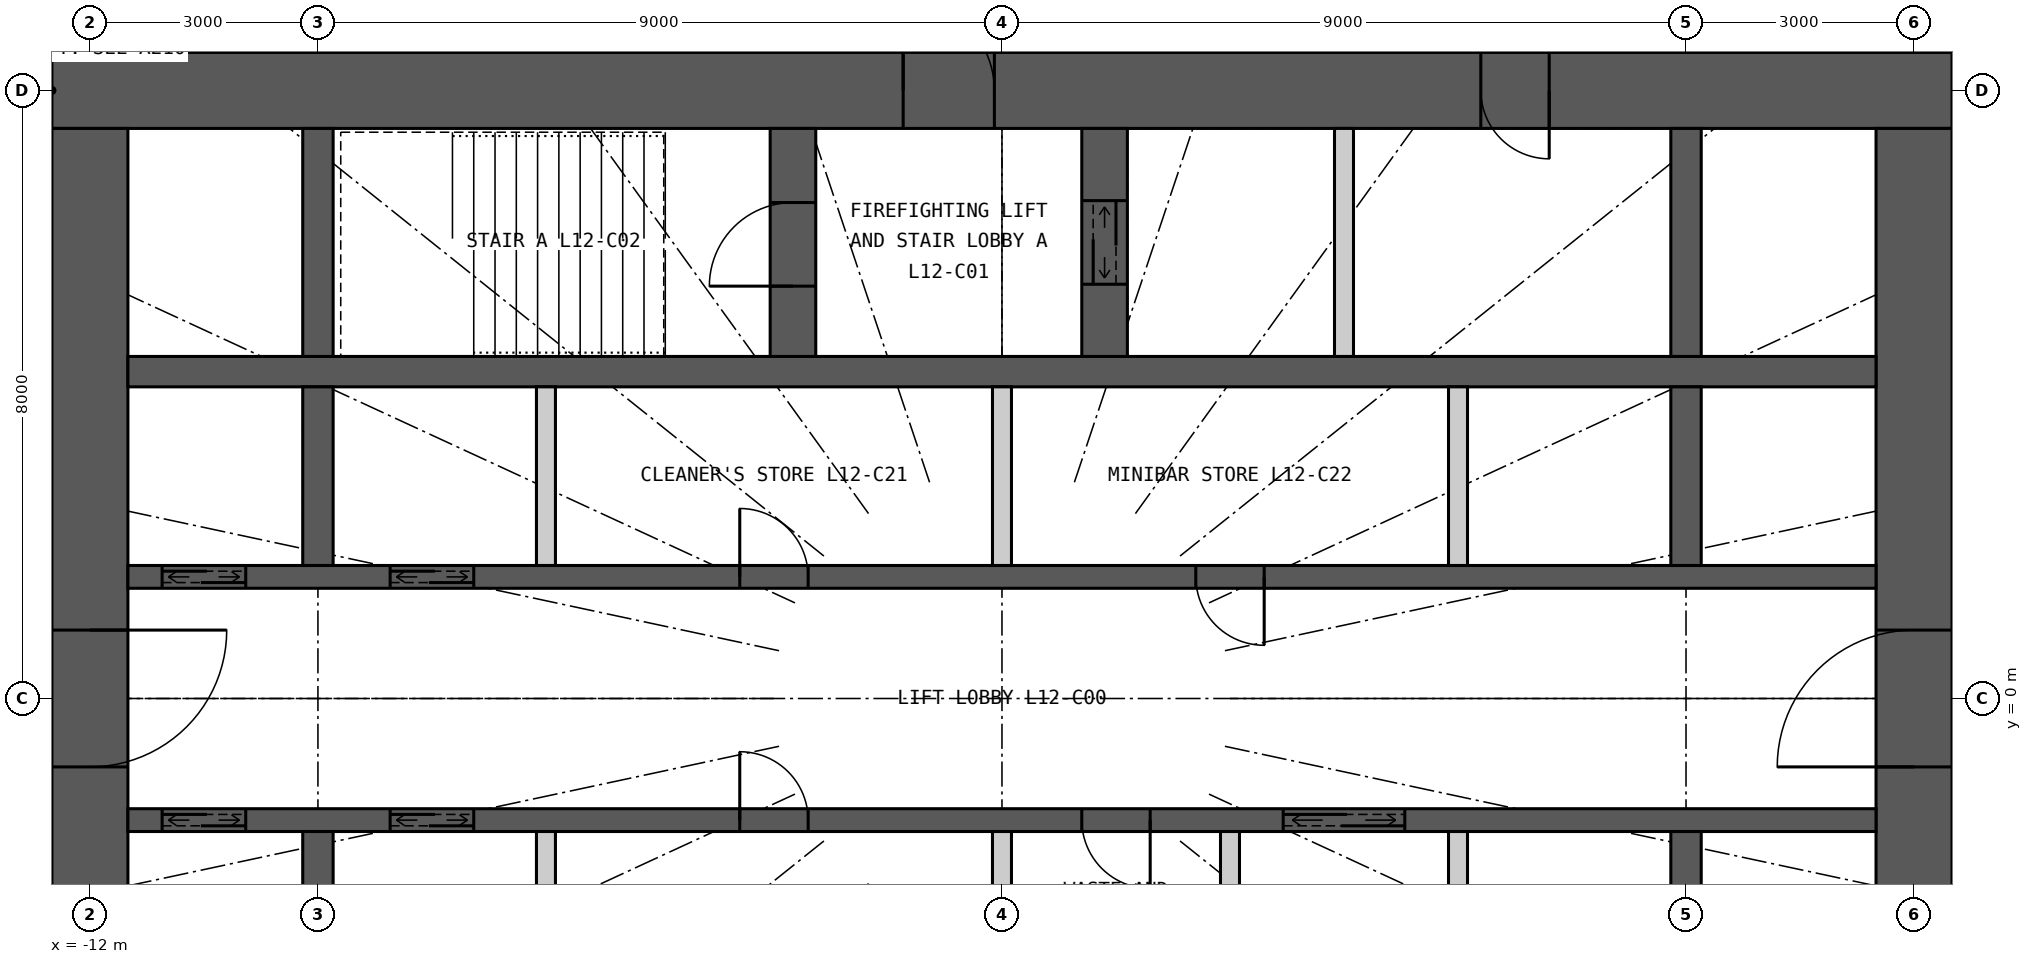
"""IFC4 building model, lengths in metres.
Left out: names, types, materials, properties, quantities, classifications, styles, units other than length and angle.
Written with IfcOpenShell. Run it as: python <this file> out.ifc"""

import sys

from ifc_helpers import new_model, si_unit, direction, frame, frame_2d, origin, place, context, subcontext, project, spatial, rectangle, extrude, element, fill, save


model = new_model("IFC4")
c1 = context("Model", 3, precision=1e-05, world=origin(), true_north=direction((0.0, 1.0)))
c2 = subcontext(c1, "Body", "Model", "MODEL_VIEW")
j1 = project(units=[si_unit("LENGTHUNIT", "METRE"), si_unit("PLANEANGLEUNIT", "RADIAN")], contexts=[c1])
p1 = place(None, origin())
s1 = spatial("IfcSite", under=j1, at=p1, CompositionType="ELEMENT")
p2 = place(p1, origin())
s2 = spatial("IfcBuilding", under=s1, at=p2, CompositionType="ELEMENT")
p3 = place(p2, frame((0.0, 0.0, 54.0)))
s3 = spatial("IfcBuildingStorey", under=s2, at=p3, CompositionType="ELEMENT", Elevation=54.0)
p4 = place(p3, frame((-12.5, 8.0, 0.0), z_axis=(0.0, 0.0, 1.0), x_axis=(1.0, 0.0, 0.0)))
e1 = element("IfcWall", 1, at=p4, inside=s3, PredefinedType="SHEAR", context=c2, shape_type="SweptSolid", body=[
    extrude(rectangle(XDim=25.0, YDim=1.0, at=frame_2d((12.5, 0.0))), origin(), (0.0, 0.0, 1.0), 3.3),
])
p5 = place(p4, frame((11.2, 0.0, 0.0)))
e2 = element("IfcOpeningElement", 2, at=p5, cuts=e1, PredefinedType="OPENING", context=c2, shape_type="SweptSolid", body=[
    extrude(rectangle(XDim=1.2, YDim=2.2, at=frame_2d((0.6, 1.1))), frame((0.0, 0.51, 0.0), z_axis=(0.0, -1.0, 0.0), x_axis=(1.0, 0.0, 0.0)), (0.0, 0.0, 1.0), 1.02),
])
p6 = place(p4, frame((18.8, 0.0, 0.0)))
e3 = element("IfcOpeningElement", 3, at=p6, cuts=e1, PredefinedType="OPENING", context=c2, shape_type="SweptSolid", body=[
    extrude(rectangle(XDim=0.9, YDim=2.2, at=frame_2d((0.45, 1.1))), frame((0.0, 0.51, 0.0), z_axis=(0.0, -1.0, 0.0), x_axis=(1.0, 0.0, 0.0)), (0.0, 0.0, 1.0), 1.02),
])
p7 = place(p3, frame((12.0, -7.5, 0.0), z_axis=(0.0, 0.0, 1.0), x_axis=(0.0, 1.0, 0.0)))
e4 = element("IfcWall", 4, at=p7, inside=s3, PredefinedType="SHEAR", context=c2, shape_type="SweptSolid", body=[
    extrude(rectangle(XDim=15.0, YDim=1.0, at=frame_2d((7.5, 0.0))), origin(), (0.0, 0.0, 1.0), 3.3),
])
p8 = place(p7, frame((6.6, 0.0, 0.0)))
e5 = element("IfcOpeningElement", 5, at=p8, cuts=e4, PredefinedType="OPENING", context=c2, shape_type="SweptSolid", body=[
    extrude(rectangle(XDim=1.8, YDim=2.2, at=frame_2d((0.9, 1.1))), frame((0.0, 0.51, 0.0), z_axis=(0.0, -1.0, 0.0), x_axis=(1.0, 0.0, 0.0)), (0.0, 0.0, 1.0), 1.02),
])
p9 = place(p3, frame((-12.0, 7.5, 0.0), z_axis=(0.0, 0.0, 1.0), x_axis=(0.0, -1.0, 0.0)))
e6 = element("IfcWall", 6, at=p9, inside=s3, PredefinedType="SHEAR", context=c2, shape_type="SweptSolid", body=[
    extrude(rectangle(XDim=15.0, YDim=1.0, at=frame_2d((7.5, 0.0))), origin(), (0.0, 0.0, 1.0), 3.3),
])
p10 = place(p9, frame((6.6, 0.0, 0.0)))
e7 = element("IfcOpeningElement", 7, at=p10, cuts=e6, PredefinedType="OPENING", context=c2, shape_type="SweptSolid", body=[
    extrude(rectangle(XDim=1.8, YDim=2.2, at=frame_2d((0.9, 1.1))), frame((0.0, 0.51, 0.0), z_axis=(0.0, -1.0, 0.0), x_axis=(1.0, 0.0, 0.0)), (0.0, 0.0, 1.0), 1.02),
])
p11 = place(p3, frame((-11.5, 4.3, 0.0), z_axis=(0.0, 0.0, 1.0), x_axis=(1.0, 0.0, 0.0)))
e8 = element("IfcWall", 8, at=p11, inside=s3, PredefinedType="SHEAR", context=c2, shape_type="SweptSolid", body=[
    extrude(rectangle(XDim=23.0, YDim=0.4, at=frame_2d((11.5, 0.0))), origin(), (0.0, 0.0, 1.0), 3.3),
])
p12 = place(p3, frame((-11.5, 1.6, 0.0), z_axis=(0.0, 0.0, 1.0), x_axis=(1.0, 0.0, 0.0)))
e9 = element("IfcWall", 9, at=p12, inside=s3, PredefinedType="SHEAR", context=c2, shape_type="SweptSolid", body=[
    extrude(rectangle(XDim=23.0, YDim=0.3, at=frame_2d((11.5, 0.0))), origin(), (0.0, 0.0, 1.0), 3.3),
])
p13 = place(p12, frame((0.45, 0.0, 0.0)))
e10 = element("IfcOpeningElement", 10, at=p13, cuts=e9, PredefinedType="OPENING", context=c2, shape_type="SweptSolid", body=[
    extrude(rectangle(XDim=1.1, YDim=2.2, at=frame_2d((0.55, 1.1))), frame((0.0, 0.16, 0.0), z_axis=(0.0, -1.0, 0.0), x_axis=(1.0, 0.0, 0.0)), (0.0, 0.0, 1.0), 0.32),
])
p14 = place(p12, frame((3.45, 0.0, 0.0)))
e11 = element("IfcOpeningElement", 11, at=p14, cuts=e9, PredefinedType="OPENING", context=c2, shape_type="SweptSolid", body=[
    extrude(rectangle(XDim=1.1, YDim=2.2, at=frame_2d((0.55, 1.1))), frame((0.0, 0.16, 0.0), z_axis=(0.0, -1.0, 0.0), x_axis=(1.0, 0.0, 0.0)), (0.0, 0.0, 1.0), 0.32),
])
p15 = place(p12, frame((8.05, 0.0, 0.0)))
e12 = element("IfcOpeningElement", 12, at=p15, cuts=e9, PredefinedType="OPENING", context=c2, shape_type="SweptSolid", body=[
    extrude(rectangle(XDim=0.9, YDim=2.2, at=frame_2d((0.45, 1.1))), frame((0.0, 0.16, 0.0), z_axis=(0.0, -1.0, 0.0), x_axis=(1.0, 0.0, 0.0)), (0.0, 0.0, 1.0), 0.32),
])
p16 = place(p12, frame((14.05, 0.0, 0.0)))
e13 = element("IfcOpeningElement", 13, at=p16, cuts=e9, PredefinedType="OPENING", context=c2, shape_type="SweptSolid", body=[
    extrude(rectangle(XDim=0.9, YDim=2.2, at=frame_2d((0.45, 1.1))), frame((0.0, 0.16, 0.0), z_axis=(0.0, -1.0, 0.0), x_axis=(1.0, 0.0, 0.0)), (0.0, 0.0, 1.0), 0.32),
])
p17 = place(p3, frame((-11.5, -1.6, 0.0), z_axis=(0.0, 0.0, 1.0), x_axis=(1.0, 0.0, 0.0)))
e14 = element("IfcWall", 14, at=p17, inside=s3, PredefinedType="SHEAR", context=c2, shape_type="SweptSolid", body=[
    extrude(rectangle(XDim=23.0, YDim=0.3, at=frame_2d((11.5, 0.0))), origin(), (0.0, 0.0, 1.0), 3.3),
])
p18 = place(p17, frame((0.45, 0.0, 0.0)))
e15 = element("IfcOpeningElement", 15, at=p18, cuts=e14, PredefinedType="OPENING", context=c2, shape_type="SweptSolid", body=[
    extrude(rectangle(XDim=1.1, YDim=2.2, at=frame_2d((0.55, 1.1))), frame((0.0, 0.16, 0.0), z_axis=(0.0, -1.0, 0.0), x_axis=(1.0, 0.0, 0.0)), (0.0, 0.0, 1.0), 0.32),
])
p19 = place(p17, frame((3.45, 0.0, 0.0)))
e16 = element("IfcOpeningElement", 16, at=p19, cuts=e14, PredefinedType="OPENING", context=c2, shape_type="SweptSolid", body=[
    extrude(rectangle(XDim=1.1, YDim=2.2, at=frame_2d((0.55, 1.1))), frame((0.0, 0.16, 0.0), z_axis=(0.0, -1.0, 0.0), x_axis=(1.0, 0.0, 0.0)), (0.0, 0.0, 1.0), 0.32),
])
p20 = place(p17, frame((15.2, 0.0, 0.0)))
e17 = element("IfcOpeningElement", 17, at=p20, cuts=e14, PredefinedType="OPENING", context=c2, shape_type="SweptSolid", body=[
    extrude(rectangle(XDim=1.6, YDim=2.4, at=frame_2d((0.8, 1.2))), frame((0.0, 0.16, 0.0), z_axis=(0.0, -1.0, 0.0), x_axis=(1.0, 0.0, 0.0)), (0.0, 0.0, 1.0), 0.32),
])
p21 = place(p17, frame((8.05, 0.0, 0.0)))
e18 = element("IfcOpeningElement", 18, at=p21, cuts=e14, PredefinedType="OPENING", context=c2, shape_type="SweptSolid", body=[
    extrude(rectangle(XDim=0.9, YDim=2.2, at=frame_2d((0.45, 1.1))), frame((0.0, 0.16, 0.0), z_axis=(0.0, -1.0, 0.0), x_axis=(1.0, 0.0, 0.0)), (0.0, 0.0, 1.0), 0.32),
])
p22 = place(p17, frame((12.55, 0.0, 0.0)))
e19 = element("IfcOpeningElement", 19, at=p22, cuts=e14, PredefinedType="OPENING", context=c2, shape_type="SweptSolid", body=[
    extrude(rectangle(XDim=0.9, YDim=2.2, at=frame_2d((0.45, 1.1))), frame((0.0, 0.16, 0.0), z_axis=(0.0, -1.0, 0.0), x_axis=(1.0, 0.0, 0.0)), (0.0, 0.0, 1.0), 0.32),
])
p23 = place(p3, frame((-9.0, 4.5, 0.0), z_axis=(0.0, 0.0, 1.0), x_axis=(0.0, 1.0, 0.0)))
e20 = element("IfcWall", 20, at=p23, inside=s3, PredefinedType="SHEAR", context=c2, shape_type="SweptSolid", body=[
    extrude(rectangle(XDim=3.0, YDim=0.4, at=frame_2d((1.5, 0.0))), origin(), (0.0, 0.0, 1.0), 3.3),
])
for number, where, z_axis, x_axis in (
    (21, (-9.0, 1.75, 0.0), (0.0, 0.0, 1.0), (0.0, 1.0, 0.0)),
    (22, (-9.0, -4.1, 0.0), (0.0, 0.0, 1.0), (0.0, 1.0, 0.0)),
):
    element("IfcWall", number, at=place(p3, frame(where, z_axis=z_axis, x_axis=x_axis)), inside=s3, PredefinedType="SHEAR", context=c2, shape_type="SweptSolid", body=[
        extrude(rectangle(XDim=2.35, YDim=0.4, at=frame_2d((1.175, 0.0))), origin(), (0.0, 0.0, 1.0), 3.3),
    ])
p24 = place(p3, frame((9.0, 4.5, 0.0), z_axis=(0.0, 0.0, 1.0), x_axis=(0.0, 1.0, 0.0)))
e23 = element("IfcWall", 23, at=p24, inside=s3, PredefinedType="SHEAR", context=c2, shape_type="SweptSolid", body=[
    extrude(rectangle(XDim=3.0, YDim=0.4, at=frame_2d((1.5, 0.0))), origin(), (0.0, 0.0, 1.0), 3.3),
])
for number, where, z_axis, x_axis in (
    (24, (9.0, 1.75, 0.0), (0.0, 0.0, 1.0), (0.0, 1.0, 0.0)),
    (25, (9.0, -4.1, 0.0), (0.0, 0.0, 1.0), (0.0, 1.0, 0.0)),
):
    element("IfcWall", number, at=place(p3, frame(where, z_axis=z_axis, x_axis=x_axis)), inside=s3, PredefinedType="SHEAR", context=c2, shape_type="SweptSolid", body=[
        extrude(rectangle(XDim=2.35, YDim=0.4, at=frame_2d((1.175, 0.0))), origin(), (0.0, 0.0, 1.0), 3.3),
    ])
p25 = place(p3, frame((-2.75, 4.5, 0.0), z_axis=(0.0, 0.0, 1.0), x_axis=(0.0, 1.0, 0.0)))
e26 = element("IfcWall", 26, at=p25, inside=s3, PredefinedType="SHEAR", context=c2, shape_type="SweptSolid", body=[
    extrude(rectangle(XDim=3.0, YDim=0.6, at=frame_2d((1.5, 0.0))), origin(), (0.0, 0.0, 1.0), 3.3),
])
p26 = place(p25, frame((0.925, 0.0, 0.0)))
e27 = element("IfcOpeningElement", 27, at=p26, cuts=e26, PredefinedType="OPENING", context=c2, shape_type="SweptSolid", body=[
    extrude(rectangle(XDim=1.1, YDim=2.2, at=frame_2d((0.55, 1.1))), frame((0.0, 0.31, 0.0), z_axis=(0.0, -1.0, 0.0), x_axis=(1.0, 0.0, 0.0)), (0.0, 0.0, 1.0), 0.62),
])
p27 = place(p3, frame((1.35, 4.5, 0.0), z_axis=(0.0, 0.0, 1.0), x_axis=(0.0, 1.0, 0.0)))
e28 = element("IfcWall", 28, at=p27, inside=s3, PredefinedType="SHEAR", context=c2, shape_type="SweptSolid", body=[
    extrude(rectangle(XDim=3.0, YDim=0.6, at=frame_2d((1.5, 0.0))), origin(), (0.0, 0.0, 1.0), 3.3),
])
p28 = place(p27, frame((0.95, 0.0, 0.0)))
e29 = element("IfcOpeningElement", 29, at=p28, cuts=e28, PredefinedType="OPENING", context=c2, shape_type="SweptSolid", body=[
    extrude(rectangle(XDim=1.1, YDim=2.2, at=frame_2d((0.55, 1.1))), frame((0.0, 0.31, 0.0), z_axis=(0.0, -1.0, 0.0), x_axis=(1.0, 0.0, 0.0)), (0.0, 0.0, 1.0), 0.62),
])
p29 = place(p3, frame((4.5, 4.5, 0.0), z_axis=(0.0, 0.0, 1.0), x_axis=(0.0, 1.0, 0.0)))
e30 = element("IfcWall", 30, at=p29, inside=s3, PredefinedType="PARTITIONING", context=c2, shape_type="SweptSolid", body=[
    extrude(rectangle(XDim=3.0, YDim=0.25, at=frame_2d((1.5, 0.0))), origin(), (0.0, 0.0, 1.0), 3.3),
])
for number, where, z_axis, x_axis in (
    (31, (-6.0, 1.75, 0.0), (0.0, 0.0, 1.0), (0.0, 1.0, 0.0)),
    (32, (0.0, 1.75, 0.0), (0.0, 0.0, 1.0), (0.0, 1.0, 0.0)),
    (33, (6.0, 1.75, 0.0), (0.0, 0.0, 1.0), (0.0, 1.0, 0.0)),
    (34, (-6.0, -4.1, 0.0), (0.0, 0.0, 1.0), (0.0, 1.0, 0.0)),
    (35, (0.0, -4.1, 0.0), (0.0, 0.0, 1.0), (0.0, 1.0, 0.0)),
    (36, (3.0, -4.1, 0.0), (0.0, 0.0, 1.0), (0.0, 1.0, 0.0)),
    (37, (6.0, -4.1, 0.0), (0.0, 0.0, 1.0), (0.0, 1.0, 0.0)),
):
    element("IfcWall", number, at=place(p3, frame(where, z_axis=z_axis, x_axis=x_axis)), inside=s3, PredefinedType="PARTITIONING", context=c2, shape_type="SweptSolid", body=[
        extrude(rectangle(XDim=2.35, YDim=0.25, at=frame_2d((1.175, 0.0))), origin(), (0.0, 0.0, 1.0), 3.3),
    ])
p30 = place(p5, origin())
e38 = element("IfcDoor", 38, at=p30, inside=s3, OperationType="SINGLE_SWING_LEFT", PredefinedType="DOOR", context=c2, shape_type="SweptSolid", body=[
    extrude(rectangle(XDim=1.2, YDim=2.2, at=frame_2d((0.6, 1.1))), frame((0.0, 0.025, 0.0), z_axis=(0.0, -1.0, 0.0), x_axis=(1.0, 0.0, 0.0)), (0.0, 0.0, 1.0), 0.05),
])
fill(e2, e38)
p31 = place(p26, origin())
e39 = element("IfcDoor", 39, at=p31, inside=s3, OperationType="SINGLE_SWING_LEFT", PredefinedType="DOOR", context=c2, shape_type="SweptSolid", body=[
    extrude(rectangle(XDim=1.1, YDim=2.2, at=frame_2d((0.55, 1.1))), frame((0.0, 0.025, 0.0), z_axis=(0.0, -1.0, 0.0), x_axis=(1.0, 0.0, 0.0)), (0.0, 0.0, 1.0), 0.05),
])
fill(e27, e39)
p32 = place(p28, origin())
e40 = element("IfcDoor", 40, at=p32, inside=s3, OperationType="DOUBLE_DOOR_SLIDING", PredefinedType="DOOR", context=c2, shape_type="SweptSolid", body=[
    extrude(rectangle(XDim=1.1, YDim=2.2, at=frame_2d((0.55, 1.1))), frame((0.0, 0.025, 0.0), z_axis=(0.0, -1.0, 0.0), x_axis=(1.0, 0.0, 0.0)), (0.0, 0.0, 1.0), 0.05),
])
fill(e29, e40)
p33 = place(p6, origin())
e41 = element("IfcDoor", 41, at=p33, inside=s3, OperationType="SINGLE_SWING_RIGHT", PredefinedType="DOOR", context=c2, shape_type="SweptSolid", body=[
    extrude(rectangle(XDim=0.9, YDim=2.2, at=frame_2d((0.45, 1.1))), frame((0.0, 0.025, 0.0), z_axis=(0.0, -1.0, 0.0), x_axis=(1.0, 0.0, 0.0)), (0.0, 0.0, 1.0), 0.05),
])
fill(e3, e41)
p34 = place(p13, origin())
e42 = element("IfcDoor", 42, at=p34, inside=s3, OperationType="DOUBLE_DOOR_SLIDING", PredefinedType="DOOR", context=c2, shape_type="SweptSolid", body=[
    extrude(rectangle(XDim=1.1, YDim=2.2, at=frame_2d((0.55, 1.1))), frame((0.0, 0.025, 0.0), z_axis=(0.0, -1.0, 0.0), x_axis=(1.0, 0.0, 0.0)), (0.0, 0.0, 1.0), 0.05),
])
fill(e10, e42)
p35 = place(p14, origin())
e43 = element("IfcDoor", 43, at=p35, inside=s3, OperationType="DOUBLE_DOOR_SLIDING", PredefinedType="DOOR", context=c2, shape_type="SweptSolid", body=[
    extrude(rectangle(XDim=1.1, YDim=2.2, at=frame_2d((0.55, 1.1))), frame((0.0, 0.025, 0.0), z_axis=(0.0, -1.0, 0.0), x_axis=(1.0, 0.0, 0.0)), (0.0, 0.0, 1.0), 0.05),
])
fill(e11, e43)
p36 = place(p18, origin())
e44 = element("IfcDoor", 44, at=p36, inside=s3, OperationType="DOUBLE_DOOR_SLIDING", PredefinedType="DOOR", context=c2, shape_type="SweptSolid", body=[
    extrude(rectangle(XDim=1.1, YDim=2.2, at=frame_2d((0.55, 1.1))), frame((0.0, 0.025, 0.0), z_axis=(0.0, -1.0, 0.0), x_axis=(1.0, 0.0, 0.0)), (0.0, 0.0, 1.0), 0.05),
])
fill(e15, e44)
p37 = place(p19, origin())
e45 = element("IfcDoor", 45, at=p37, inside=s3, OperationType="DOUBLE_DOOR_SLIDING", PredefinedType="DOOR", context=c2, shape_type="SweptSolid", body=[
    extrude(rectangle(XDim=1.1, YDim=2.2, at=frame_2d((0.55, 1.1))), frame((0.0, 0.025, 0.0), z_axis=(0.0, -1.0, 0.0), x_axis=(1.0, 0.0, 0.0)), (0.0, 0.0, 1.0), 0.05),
])
fill(e16, e45)
p38 = place(p20, origin())
e46 = element("IfcDoor", 46, at=p38, inside=s3, OperationType="DOUBLE_DOOR_SLIDING", PredefinedType="DOOR", context=c2, shape_type="SweptSolid", body=[
    extrude(rectangle(XDim=1.6, YDim=2.4, at=frame_2d((0.8, 1.2))), frame((0.0, 0.025, 0.0), z_axis=(0.0, -1.0, 0.0), x_axis=(1.0, 0.0, 0.0)), (0.0, 0.0, 1.0), 0.05),
])
fill(e17, e46)
p39 = place(p15, origin())
e47 = element("IfcDoor", 47, at=p39, inside=s3, OperationType="SINGLE_SWING_LEFT", PredefinedType="DOOR", context=c2, shape_type="SweptSolid", body=[
    extrude(rectangle(XDim=0.9, YDim=2.2, at=frame_2d((0.45, 1.1))), frame((0.0, 0.025, 0.0), z_axis=(0.0, -1.0, 0.0), x_axis=(1.0, 0.0, 0.0)), (0.0, 0.0, 1.0), 0.05),
])
fill(e12, e47)
p40 = place(p16, origin())
e48 = element("IfcDoor", 48, at=p40, inside=s3, OperationType="SINGLE_SWING_RIGHT", PredefinedType="DOOR", context=c2, shape_type="SweptSolid", body=[
    extrude(rectangle(XDim=0.9, YDim=2.2, at=frame_2d((0.45, 1.1))), frame((0.0, 0.025, 0.0), z_axis=(0.0, -1.0, 0.0), x_axis=(1.0, 0.0, 0.0)), (0.0, 0.0, 1.0), 0.05),
])
fill(e13, e48)
p41 = place(p21, origin())
e49 = element("IfcDoor", 49, at=p41, inside=s3, OperationType="SINGLE_SWING_LEFT", PredefinedType="DOOR", context=c2, shape_type="SweptSolid", body=[
    extrude(rectangle(XDim=0.9, YDim=2.2, at=frame_2d((0.45, 1.1))), frame((0.0, 0.025, 0.0), z_axis=(0.0, -1.0, 0.0), x_axis=(1.0, 0.0, 0.0)), (0.0, 0.0, 1.0), 0.05),
])
fill(e18, e49)
p42 = place(p22, origin())
e50 = element("IfcDoor", 50, at=p42, inside=s3, OperationType="SINGLE_SWING_RIGHT", PredefinedType="DOOR", context=c2, shape_type="SweptSolid", body=[
    extrude(rectangle(XDim=0.9, YDim=2.2, at=frame_2d((0.45, 1.1))), frame((0.0, 0.025, 0.0), z_axis=(0.0, -1.0, 0.0), x_axis=(1.0, 0.0, 0.0)), (0.0, 0.0, 1.0), 0.05),
])
fill(e19, e50)
p43 = place(p8, origin())
e51 = element("IfcDoor", 51, at=p43, inside=s3, OperationType="DOUBLE_DOOR_DOUBLE_SWING", PredefinedType="DOOR", context=c2, shape_type="SweptSolid", body=[
    extrude(rectangle(XDim=1.8, YDim=2.2, at=frame_2d((0.9, 1.1))), frame((0.0, 0.025, 0.0), z_axis=(0.0, -1.0, 0.0), x_axis=(1.0, 0.0, 0.0)), (0.0, 0.0, 1.0), 0.05),
])
fill(e5, e51)
p44 = place(p10, origin())
e52 = element("IfcDoor", 52, at=p44, inside=s3, OperationType="DOUBLE_DOOR_DOUBLE_SWING", PredefinedType="DOOR", context=c2, shape_type="SweptSolid", body=[
    extrude(rectangle(XDim=1.8, YDim=2.2, at=frame_2d((0.9, 1.1))), frame((0.0, 0.025, 0.0), z_axis=(0.0, -1.0, 0.0), x_axis=(1.0, 0.0, 0.0)), (0.0, 0.0, 1.0), 0.05),
])
fill(e7, e52)
save(model, sys.argv[1])
